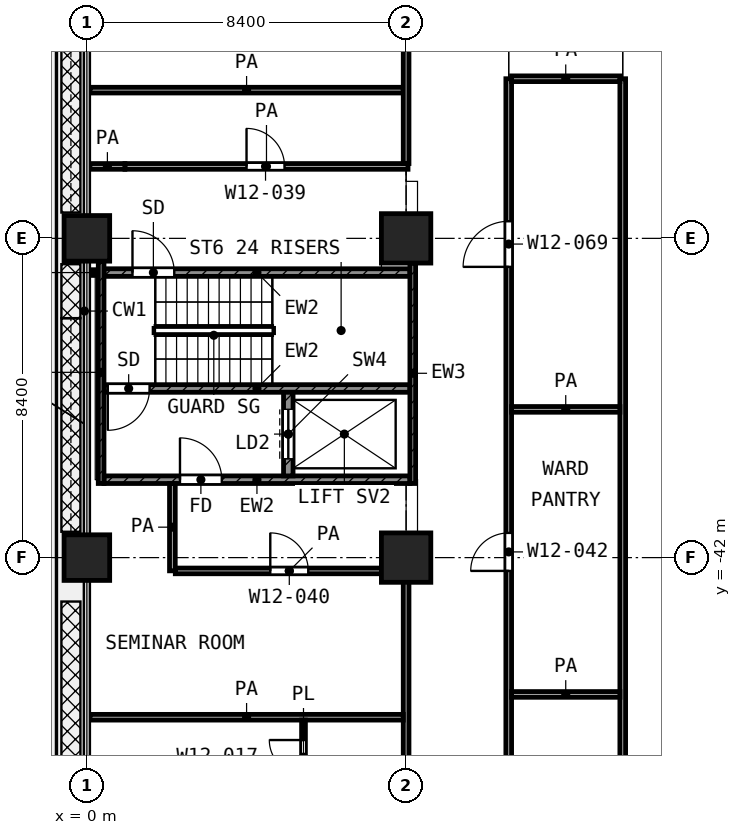
"""IFC4 building model, lengths in metres.
Left out: names, types, materials, properties, quantities, classifications, styles, units other than length and angle.
Written with IfcOpenShell. Run it as: python <this file> out.ifc"""

import sys

from ifc_helpers import new_model, si_unit, direction, frame, frame_2d, origin, origin_2d, place, context, subcontext, project, spatial, rectangle, extrude, element, fill, save


model = new_model("IFC4")
c1 = context("Model", 3, precision=1e-05, world=origin(), true_north=direction((0.0, 1.0)))
c2 = subcontext(c1, "Body", "Model", "MODEL_VIEW")
j1 = project(units=[si_unit("LENGTHUNIT", "METRE"), si_unit("PLANEANGLEUNIT", "RADIAN")], contexts=[c1])
p1 = place(None, origin())
s1 = spatial("IfcSite", under=j1, at=p1, CompositionType="ELEMENT")
p2 = place(p1, origin())
s2 = spatial("IfcBuilding", under=s1, at=p2, CompositionType="ELEMENT")
p3 = place(p2, frame((0.0, 0.0, 56.0)))
s3 = spatial("IfcBuildingStorey", under=s2, at=p3, CompositionType="ELEMENT", Elevation=56.0)
p4 = place(p3, frame((0.0, -33.6, 0.0), z_axis=(0.0, 0.0, 1.0), x_axis=(1.0, 0.0, 0.0)))
e1 = element("IfcColumn", 1, at=p4, inside=s3, PredefinedType="COLUMN", context=c2, shape_type="SweptSolid", body=[
    extrude(rectangle(XDim=1.2, YDim=1.2, at=origin_2d()), origin(), (0.0, 0.0, 1.0), 4.2),
])
p5 = place(p3, frame((8.4, -33.6, 0.0), z_axis=(0.0, 0.0, 1.0), x_axis=(1.0, 0.0, 0.0)))
e2 = element("IfcColumn", 2, at=p5, inside=s3, PredefinedType="COLUMN", context=c2, shape_type="SweptSolid", body=[
    extrude(rectangle(XDim=1.3, YDim=1.3, at=origin_2d()), origin(), (0.0, 0.0, 1.0), 4.2),
])
p6 = place(p3, frame((0.0, -42.0, 0.0), z_axis=(0.0, 0.0, 1.0), x_axis=(1.0, 0.0, 0.0)))
e3 = element("IfcColumn", 3, at=p6, inside=s3, PredefinedType="COLUMN", context=c2, shape_type="SweptSolid", body=[
    extrude(rectangle(XDim=1.2, YDim=1.2, at=origin_2d()), origin(), (0.0, 0.0, 1.0), 4.2),
])
p7 = place(p3, frame((8.4, -42.0, 0.0), z_axis=(0.0, 0.0, 1.0), x_axis=(1.0, 0.0, 0.0)))
e4 = element("IfcColumn", 4, at=p7, inside=s3, PredefinedType="COLUMN", context=c2, shape_type="SweptSolid", body=[
    extrude(rectangle(XDim=1.3, YDim=1.3, at=origin_2d()), origin(), (0.0, 0.0, 1.0), 4.2),
])
p8 = place(p3, frame((0.375, -40.05, 0.0), z_axis=(0.0, 0.0, 1.0), x_axis=(0.0, 1.0, 0.0)))
e5 = element("IfcWall", 5, at=p8, inside=s3, PredefinedType="SHEAR", context=c2, shape_type="SweptSolid", body=[
    extrude(rectangle(XDim=5.85, YDim=0.15, at=frame_2d((2.925, 0.0))), origin(), (0.0, 0.0, 1.0), 3.9),
])
p9 = place(p3, frame((8.575, -40.05, 0.0), z_axis=(0.0, 0.0, 1.0), x_axis=(0.0, 1.0, 0.0)))
e6 = element("IfcWall", 6, at=p9, inside=s3, PredefinedType="SHEAR", context=c2, shape_type="SweptSolid", body=[
    extrude(rectangle(XDim=5.8, YDim=0.15, at=frame_2d((2.9, 0.0))), origin(), (0.0, 0.0, 1.0), 3.9),
])
p10 = place(p3, frame((0.45, -34.5, 0.0), z_axis=(0.0, 0.0, 1.0), x_axis=(1.0, 0.0, 0.0)))
e7 = element("IfcWall", 7, at=p10, inside=s3, PredefinedType="SHEAR", context=c2, shape_type="SweptSolid", body=[
    extrude(rectangle(XDim=8.05, YDim=0.2, at=frame_2d((4.025, 0.0))), origin(), (0.0, 0.0, 1.0), 3.9),
])
p11 = place(p10, frame((0.75, 0.0, 0.0)))
e8 = element("IfcOpeningElement", 8, at=p11, cuts=e7, PredefinedType="OPENING", context=c2, shape_type="SweptSolid", body=[
    extrude(rectangle(XDim=1.1, YDim=2.1, at=frame_2d((0.55, 1.05))), frame((0.0, 0.11, 0.0), z_axis=(0.0, -1.0, 0.0), x_axis=(1.0, 0.0, 0.0)), (0.0, 0.0, 1.0), 0.22),
])
p12 = place(p3, frame((0.45, -37.55, 0.0), z_axis=(0.0, 0.0, 1.0), x_axis=(1.0, 0.0, 0.0)))
e9 = element("IfcWall", 9, at=p12, inside=s3, PredefinedType="SHEAR", context=c2, shape_type="SweptSolid", body=[
    extrude(rectangle(XDim=8.05, YDim=0.2, at=frame_2d((4.025, 0.0))), origin(), (0.0, 0.0, 1.0), 3.9),
])
p13 = place(p12, frame((0.1, 0.0, 0.0)))
e10 = element("IfcOpeningElement", 10, at=p13, cuts=e9, PredefinedType="OPENING", context=c2, shape_type="SweptSolid", body=[
    extrude(rectangle(XDim=1.1, YDim=2.1, at=frame_2d((0.55, 1.05))), frame((0.0, 0.11, 0.0), z_axis=(0.0, -1.0, 0.0), x_axis=(1.0, 0.0, 0.0)), (0.0, 0.0, 1.0), 0.22),
])
p14 = place(p3, frame((0.45, -39.95, 0.0), z_axis=(0.0, 0.0, 1.0), x_axis=(1.0, 0.0, 0.0)))
e11 = element("IfcWall", 11, at=p14, inside=s3, PredefinedType="SHEAR", context=c2, shape_type="SweptSolid", body=[
    extrude(rectangle(XDim=8.05, YDim=0.2, at=frame_2d((4.025, 0.0))), origin(), (0.0, 0.0, 1.0), 3.9),
])
p15 = place(p14, frame((2.0, 0.0, 0.0)))
e12 = element("IfcOpeningElement", 12, at=p15, cuts=e11, PredefinedType="OPENING", context=c2, shape_type="SweptSolid", body=[
    extrude(rectangle(XDim=1.1, YDim=2.1, at=frame_2d((0.55, 1.05))), frame((0.0, 0.11, 0.0), z_axis=(0.0, -1.0, 0.0), x_axis=(1.0, 0.0, 0.0)), (0.0, 0.0, 1.0), 0.22),
])
p16 = place(p3, frame((5.3, -39.85, 0.0), z_axis=(0.0, 0.0, 1.0), x_axis=(0.0, 1.0, 0.0)))
e13 = element("IfcWall", 13, at=p16, inside=s3, PredefinedType="SHEAR", context=c2, shape_type="SweptSolid", body=[
    extrude(rectangle(XDim=2.2, YDim=0.25, at=frame_2d((1.1, 0.0))), origin(), (0.0, 0.0, 1.0), 3.9),
])
p17 = place(p16, frame((0.45, 0.0, 0.0)))
e14 = element("IfcOpeningElement", 14, at=p17, cuts=e13, PredefinedType="OPENING", context=c2, shape_type="SweptSolid", body=[
    extrude(rectangle(XDim=1.3, YDim=2.1, at=frame_2d((0.65, 1.05))), frame((0.0, 0.135, 0.0), z_axis=(0.0, -1.0, 0.0), x_axis=(1.0, 0.0, 0.0)), (0.0, 0.0, 1.0), 0.27),
])
p18 = place(p3, frame((5.7, -48.3, 0.0), z_axis=(0.0, 0.0, 1.0), x_axis=(0.0, 1.0, 0.0)))
e15 = element("IfcWall", 15, at=p18, inside=s3, PredefinedType="PARTITIONING", context=c2, shape_type="SweptSolid", body=[
    extrude(rectangle(XDim=2.025, YDim=0.1, at=frame_2d((1.013, 0.0))), origin(), (0.0, 0.0, 1.0), 3.9),
])
p19 = place(p18, frame((0.6, 0.0, 0.0)))
e16 = element("IfcOpeningElement", 16, at=p19, cuts=e15, PredefinedType="OPENING", context=c2, shape_type="SweptSolid", body=[
    extrude(rectangle(XDim=0.9, YDim=2.1, at=frame_2d((0.45, 1.05))), frame((0.0, 0.06, 0.0), z_axis=(0.0, -1.0, 0.0), x_axis=(1.0, 0.0, 0.0)), (0.0, 0.0, 1.0), 0.12),
])
p20 = place(p3, frame((0.08, -46.2, 0.0), z_axis=(0.0, 0.0, 1.0), x_axis=(1.0, 0.0, 0.0)))
e17 = element("IfcWall", 17, at=p20, inside=s3, PredefinedType="PARTITIONING", context=c2, shape_type="SweptSolid", body=[
    extrude(rectangle(XDim=8.245, YDim=0.15, at=frame_2d((4.123, 0.0))), origin(), (0.0, 0.0, 1.0), 3.9),
])
p21 = place(p3, frame((11.175, -45.6, 0.0), z_axis=(0.0, 0.0, 1.0), x_axis=(1.0, 0.0, 0.0)))
e18 = element("IfcWall", 18, at=p21, inside=s3, PredefinedType="PARTITIONING", context=c2, shape_type="SweptSolid", body=[
    extrude(rectangle(XDim=2.85, YDim=0.15, at=frame_2d((1.425, 0.0))), origin(), (0.0, 0.0, 1.0), 3.9),
])
p22 = place(p3, frame((2.327, -42.35, 0.0), z_axis=(0.0, 0.0, 1.0), x_axis=(1.0, 0.0, 0.0)))
e19 = element("IfcWall", 19, at=p22, inside=s3, PredefinedType="PARTITIONING", context=c2, shape_type="SweptSolid", body=[
    extrude(rectangle(XDim=5.998, YDim=0.15, at=frame_2d((2.999, 0.0))), origin(), (0.0, 0.0, 1.0), 3.9),
])
p23 = place(p22, frame((2.499, 0.0, 0.0)))
e20 = element("IfcOpeningElement", 20, at=p23, cuts=e19, PredefinedType="OPENING", context=c2, shape_type="SweptSolid", body=[
    extrude(rectangle(XDim=1.0, YDim=2.1, at=frame_2d((0.5, 1.05))), frame((0.0, 0.085, 0.0), z_axis=(0.0, -1.0, 0.0), x_axis=(1.0, 0.0, 0.0)), (0.0, 0.0, 1.0), 0.17),
])
p24 = place(p3, frame((11.175, -38.1, 0.0), z_axis=(0.0, 0.0, 1.0), x_axis=(1.0, 0.0, 0.0)))
e21 = element("IfcWall", 21, at=p24, inside=s3, PredefinedType="PARTITIONING", context=c2, shape_type="SweptSolid", body=[
    extrude(rectangle(XDim=2.85, YDim=0.15, at=frame_2d((1.425, 0.0))), origin(), (0.0, 0.0, 1.0), 3.9),
])
p25 = place(p3, frame((0.08, -34.5, 0.0), z_axis=(0.0, 0.0, 1.0), x_axis=(1.0, 0.0, 0.0)))
e22 = element("IfcWall", 22, at=p25, inside=s3, PredefinedType="PARTITIONING", context=c2, shape_type="SweptSolid", body=[
    extrude(rectangle(XDim=0.19, YDim=0.15, at=frame_2d((0.095, 0.0))), origin(), (0.0, 0.0, 1.0), 3.9),
])
p26 = place(p3, frame((0.08, -31.707, 0.0), z_axis=(0.0, 0.0, 1.0), x_axis=(1.0, 0.0, 0.0)))
e23 = element("IfcWall", 23, at=p26, inside=s3, PredefinedType="PARTITIONING", context=c2, shape_type="SweptSolid", body=[
    extrude(rectangle(XDim=0.92, YDim=0.15, at=frame_2d((0.46, 0.0))), origin(), (0.0, 0.0, 1.0), 3.9),
])
p27 = place(p3, frame((1.002, -31.707, 0.0), z_axis=(0.0, 0.0, 1.0), x_axis=(1.0, 0.0, 0.0)))
e24 = element("IfcWall", 24, at=p27, inside=s3, PredefinedType="PARTITIONING", context=c2, shape_type="SweptSolid", body=[
    extrude(rectangle(XDim=7.448, YDim=0.15, at=frame_2d((3.724, 0.0))), origin(), (0.0, 0.0, 1.0), 3.9),
])
p28 = place(p27, frame((3.199, 0.0, 0.0)))
e25 = element("IfcOpeningElement", 25, at=p28, cuts=e24, PredefinedType="OPENING", context=c2, shape_type="SweptSolid", body=[
    extrude(rectangle(XDim=1.0, YDim=2.1, at=frame_2d((0.5, 1.05))), frame((0.0, 0.085, 0.0), z_axis=(0.0, -1.0, 0.0), x_axis=(1.0, 0.0, 0.0)), (0.0, 0.0, 1.0), 0.17),
])
p29 = place(p3, frame((0.08, -29.7, 0.0), z_axis=(0.0, 0.0, 1.0), x_axis=(1.0, 0.0, 0.0)))
e26 = element("IfcWall", 26, at=p29, inside=s3, PredefinedType="PARTITIONING", context=c2, shape_type="SweptSolid", body=[
    extrude(rectangle(XDim=8.245, YDim=0.15, at=frame_2d((4.123, 0.0))), origin(), (0.0, 0.0, 1.0), 3.9),
])
p30 = place(p3, frame((11.175, -29.4, 0.0), z_axis=(0.0, 0.0, 1.0), x_axis=(1.0, 0.0, 0.0)))
e27 = element("IfcWall", 27, at=p30, inside=s3, PredefinedType="PARTITIONING", context=c2, shape_type="SweptSolid", body=[
    extrude(rectangle(XDim=2.85, YDim=0.15, at=frame_2d((1.425, 0.0))), origin(), (0.0, 0.0, 1.0), 3.9),
])
p31 = place(p3, frame((2.25, -42.348, 0.0), z_axis=(0.0, 0.0, 1.0), x_axis=(0.0, 1.0, 0.0)))
e28 = element("IfcWall", 28, at=p31, inside=s3, PredefinedType="PARTITIONING", context=c2, shape_type="SweptSolid", body=[
    extrude(rectangle(XDim=2.298, YDim=0.15, at=frame_2d((1.149, 0.0))), origin(), (0.0, 0.0, 1.0), 3.9),
])
p32 = place(p3, frame((8.4, -58.798, 0.0), z_axis=(0.0, 0.0, 1.0), x_axis=(0.0, 1.0, 0.0)))
e29 = element("IfcWall", 29, at=p32, inside=s3, PredefinedType="PARTITIONING", context=c2, shape_type="SweptSolid", body=[
    extrude(rectangle(XDim=16.448, YDim=0.15, at=frame_2d((8.224, 0.0))), origin(), (0.0, 0.0, 1.0), 3.9),
])
p33 = place(p32, frame((9.098, 0.0, 0.0)))
e30 = element("IfcOpeningElement", 30, at=p33, cuts=e29, PredefinedType="OPENING", context=c2, shape_type="SweptSolid", body=[
    extrude(rectangle(XDim=1.2, YDim=2.1, at=frame_2d((0.6, 1.05))), frame((0.0, 0.085, 0.0), z_axis=(0.0, -1.0, 0.0), x_axis=(1.0, 0.0, 0.0)), (0.0, 0.0, 1.0), 0.17),
])
p34 = place(p32, frame((0.699, 0.0, 0.0)))
e31 = element("IfcOpeningElement", 31, at=p34, cuts=e29, PredefinedType="OPENING", context=c2, shape_type="SweptSolid", body=[
    extrude(rectangle(XDim=1.2, YDim=2.1, at=frame_2d((0.6, 1.05))), frame((0.0, 0.085, 0.0), z_axis=(0.0, -1.0, 0.0), x_axis=(1.0, 0.0, 0.0)), (0.0, 0.0, 1.0), 0.17),
])
p35 = place(p32, frame((6.498, 0.0, 0.0)))
e32 = element("IfcOpeningElement", 32, at=p35, cuts=e29, PredefinedType="OPENING", context=c2, shape_type="SweptSolid", body=[
    extrude(rectangle(XDim=1.2, YDim=2.1, at=frame_2d((0.6, 1.05))), frame((0.0, 0.085, 0.0), z_axis=(0.0, -1.0, 0.0), x_axis=(1.0, 0.0, 0.0)), (0.0, 0.0, 1.0), 0.17),
])
p36 = place(p3, frame((8.4, -31.632, 0.0), z_axis=(0.0, 0.0, 1.0), x_axis=(0.0, 1.0, 0.0)))
e33 = element("IfcWall", 33, at=p36, inside=s3, PredefinedType="PARTITIONING", context=c2, shape_type="SweptSolid", body=[
    extrude(rectangle(XDim=6.532, YDim=0.15, at=frame_2d((3.266, 0.0))), origin(), (0.0, 0.0, 1.0), 3.9),
])
p37 = place(p36, frame((3.582, 0.0, 0.0)))
e34 = element("IfcOpeningElement", 34, at=p37, cuts=e33, PredefinedType="OPENING", context=c2, shape_type="SweptSolid", body=[
    extrude(rectangle(XDim=1.2, YDim=2.1, at=frame_2d((0.6, 1.05))), frame((0.0, 0.085, 0.0), z_axis=(0.0, -1.0, 0.0), x_axis=(1.0, 0.0, 0.0)), (0.0, 0.0, 1.0), 0.17),
])
p38 = place(p3, frame((11.1, -68.7, 0.0), z_axis=(0.0, 0.0, 1.0), x_axis=(0.0, 1.0, 0.0)))
e35 = element("IfcWall", 35, at=p38, inside=s3, PredefinedType="PARTITIONING", context=c2, shape_type="SweptSolid", body=[
    extrude(rectangle(XDim=39.3, YDim=0.15, at=frame_2d((19.65, 0.0))), origin(), (0.0, 0.0, 1.0), 3.9),
])
p39 = place(p38, frame((34.35, 0.0, 0.0)))
e36 = element("IfcOpeningElement", 36, at=p39, cuts=e35, PredefinedType="OPENING", context=c2, shape_type="SweptSolid", body=[
    extrude(rectangle(XDim=1.2, YDim=2.1, at=frame_2d((0.6, 1.05))), frame((0.0, 0.085, 0.0), z_axis=(0.0, -1.0, 0.0), x_axis=(1.0, 0.0, 0.0)), (0.0, 0.0, 1.0), 0.17),
])
p40 = place(p38, frame((26.35, 0.0, 0.0)))
e37 = element("IfcOpeningElement", 37, at=p40, cuts=e35, PredefinedType="OPENING", context=c2, shape_type="SweptSolid", body=[
    extrude(rectangle(XDim=1.0, YDim=2.1, at=frame_2d((0.5, 1.05))), frame((0.0, 0.085, 0.0), z_axis=(0.0, -1.0, 0.0), x_axis=(1.0, 0.0, 0.0)), (0.0, 0.0, 1.0), 0.17),
])
p41 = place(p38, frame((6.55, 0.0, 0.0)))
e38 = element("IfcOpeningElement", 38, at=p41, cuts=e35, PredefinedType="OPENING", context=c2, shape_type="SweptSolid", body=[
    extrude(rectangle(XDim=1.0, YDim=2.1, at=frame_2d((0.5, 1.05))), frame((0.0, 0.085, 0.0), z_axis=(0.0, -1.0, 0.0), x_axis=(1.0, 0.0, 0.0)), (0.0, 0.0, 1.0), 0.17),
])
p42 = place(p3, frame((14.1, -68.7, 0.0), z_axis=(0.0, 0.0, 1.0), x_axis=(0.0, 1.0, 0.0)))
e39 = element("IfcWall", 39, at=p42, inside=s3, PredefinedType="PARTITIONING", context=c2, shape_type="SweptSolid", body=[
    extrude(rectangle(XDim=39.3, YDim=0.15, at=frame_2d((19.65, 0.0))), origin(), (0.0, 0.0, 1.0), 3.9),
])
p43 = place(p42, frame((18.1, 0.0, 0.0)))
e40 = element("IfcOpeningElement", 40, at=p43, cuts=e39, PredefinedType="OPENING", context=c2, shape_type="SweptSolid", body=[
    extrude(rectangle(XDim=1.0, YDim=2.1, at=frame_2d((0.5, 1.05))), frame((0.0, 0.085, 0.0), z_axis=(0.0, -1.0, 0.0), x_axis=(1.0, 0.0, 0.0)), (0.0, 0.0, 1.0), 0.17),
])
p44 = place(p11, origin())
e41 = element("IfcDoor", 41, at=p44, inside=s3, OperationType="SINGLE_SWING_LEFT", PredefinedType="DOOR", context=c2, shape_type="SweptSolid", body=[
    extrude(rectangle(XDim=1.1, YDim=2.1, at=frame_2d((0.55, 1.05))), frame((0.0, 0.025, 0.0), z_axis=(0.0, -1.0, 0.0), x_axis=(1.0, 0.0, 0.0)), (0.0, 0.0, 1.0), 0.05),
])
fill(e8, e41)
p45 = place(p13, frame((1.1, 0.0, 0.0), z_axis=(0.0, 0.0, 1.0), x_axis=(-1.0, 0.0, 0.0)))
e42 = element("IfcDoor", 42, at=p45, inside=s3, OperationType="SINGLE_SWING_LEFT", PredefinedType="DOOR", context=c2, shape_type="SweptSolid", body=[
    extrude(rectangle(XDim=1.1, YDim=2.1, at=frame_2d((0.55, 1.05))), frame((0.0, 0.025, 0.0), z_axis=(0.0, -1.0, 0.0), x_axis=(1.0, 0.0, 0.0)), (0.0, 0.0, 1.0), 0.05),
])
fill(e10, e42)
p46 = place(p17, origin())
e43 = element("IfcDoor", 43, at=p46, inside=s3, OperationType="DOUBLE_DOOR_SLIDING", PredefinedType="DOOR", context=c2, shape_type="SweptSolid", body=[
    extrude(rectangle(XDim=1.3, YDim=2.1, at=frame_2d((0.65, 1.05))), frame((0.0, 0.025, 0.0), z_axis=(0.0, -1.0, 0.0), x_axis=(1.0, 0.0, 0.0)), (0.0, 0.0, 1.0), 0.05),
])
fill(e14, e43)
p47 = place(p15, origin())
e44 = element("IfcDoor", 44, at=p47, inside=s3, OperationType="SINGLE_SWING_LEFT", PredefinedType="DOOR", context=c2, shape_type="SweptSolid", body=[
    extrude(rectangle(XDim=1.1, YDim=2.1, at=frame_2d((0.55, 1.05))), frame((0.0, 0.025, 0.0), z_axis=(0.0, -1.0, 0.0), x_axis=(1.0, 0.0, 0.0)), (0.0, 0.0, 1.0), 0.05),
])
fill(e12, e44)
p48 = place(p28, origin())
e45 = element("IfcDoor", 45, at=p48, inside=s3, OperationType="SINGLE_SWING_LEFT", PredefinedType="DOOR", context=c2, shape_type="SweptSolid", body=[
    extrude(rectangle(XDim=1.0, YDim=2.1, at=frame_2d((0.5, 1.05))), frame((0.0, 0.025, 0.0), z_axis=(0.0, -1.0, 0.0), x_axis=(1.0, 0.0, 0.0)), (0.0, 0.0, 1.0), 0.05),
])
fill(e25, e45)
p49 = place(p23, origin())
e46 = element("IfcDoor", 46, at=p49, inside=s3, OperationType="SINGLE_SWING_LEFT", PredefinedType="DOOR", context=c2, shape_type="SweptSolid", body=[
    extrude(rectangle(XDim=1.0, YDim=2.1, at=frame_2d((0.5, 1.05))), frame((0.0, 0.025, 0.0), z_axis=(0.0, -1.0, 0.0), x_axis=(1.0, 0.0, 0.0)), (0.0, 0.0, 1.0), 0.05),
])
fill(e20, e46)
p50 = place(p19, origin())
e47 = element("IfcDoor", 47, at=p50, inside=s3, OperationType="SINGLE_SWING_RIGHT", PredefinedType="DOOR", context=c2, shape_type="SweptSolid", body=[
    extrude(rectangle(XDim=0.9, YDim=2.1, at=frame_2d((0.45, 1.05))), frame((0.0, 0.025, 0.0), z_axis=(0.0, -1.0, 0.0), x_axis=(1.0, 0.0, 0.0)), (0.0, 0.0, 1.0), 0.05),
])
fill(e16, e47)
p51 = place(p39, origin())
e48 = element("IfcDoor", 48, at=p51, inside=s3, OperationType="SINGLE_SWING_LEFT", PredefinedType="DOOR", context=c2, shape_type="SweptSolid", body=[
    extrude(rectangle(XDim=1.2, YDim=2.1, at=frame_2d((0.6, 1.05))), frame((0.0, 0.025, 0.0), z_axis=(0.0, -1.0, 0.0), x_axis=(1.0, 0.0, 0.0)), (0.0, 0.0, 1.0), 0.05),
])
fill(e36, e48)
p52 = place(p40, origin())
e49 = element("IfcDoor", 49, at=p52, inside=s3, OperationType="SINGLE_SWING_LEFT", PredefinedType="DOOR", context=c2, shape_type="SweptSolid", body=[
    extrude(rectangle(XDim=1.0, YDim=2.1, at=frame_2d((0.5, 1.05))), frame((0.0, 0.025, 0.0), z_axis=(0.0, -1.0, 0.0), x_axis=(1.0, 0.0, 0.0)), (0.0, 0.0, 1.0), 0.05),
])
fill(e37, e49)
save(model, sys.argv[1])
